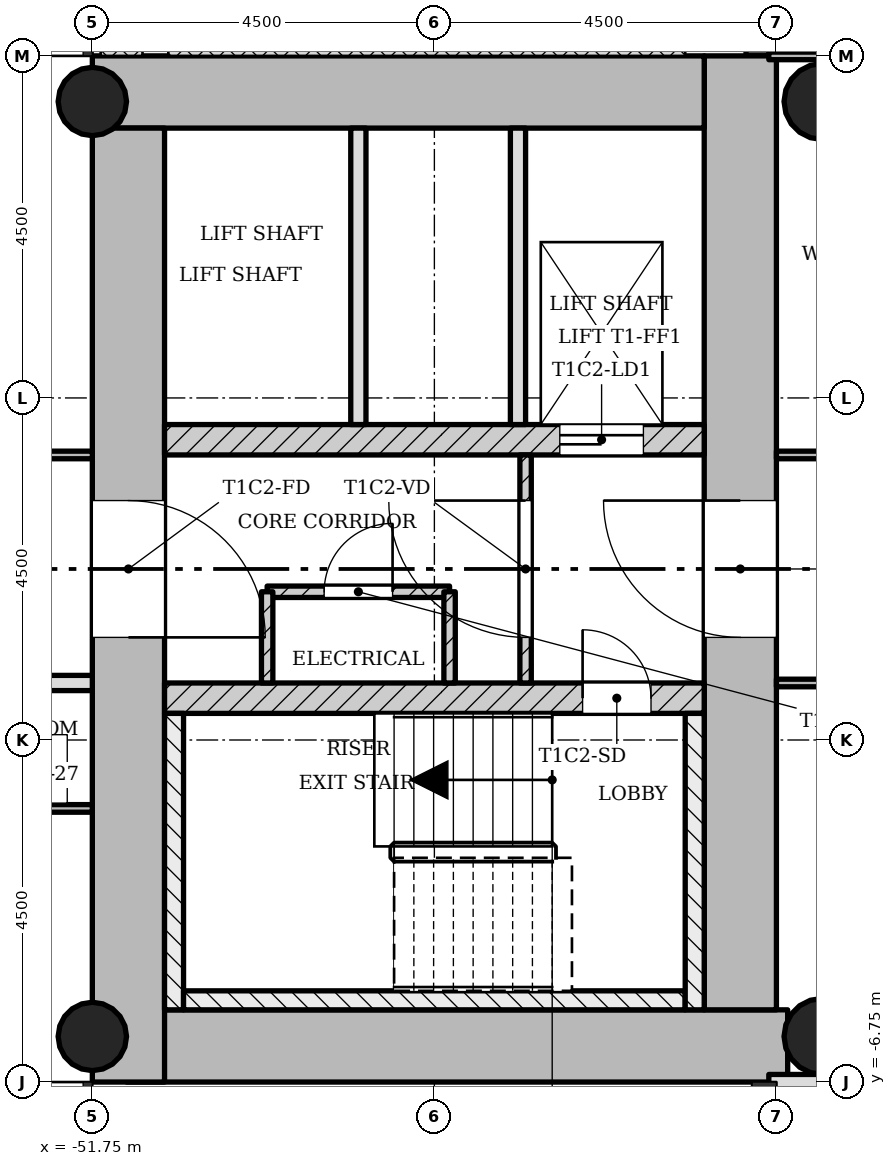
"""IFC4 building model, lengths in metres.
Left out: names, types, materials, properties, quantities, classifications, styles, units other than length and angle.
Written with IfcOpenShell. Run it as: python <this file> out.ifc"""

import sys

from ifc_helpers import new_model, si_unit, direction, frame, frame_2d, origin, origin_2d, place, context, subcontext, project, spatial, rectangle, hollow_circle, extrude, element, fill, save


model = new_model("IFC4")
c1 = context("Model", 3, precision=1e-05, world=origin(), true_north=direction((0.0, 1.0)))
c2 = subcontext(c1, "Body", "Model", "MODEL_VIEW")
j1 = project(units=[si_unit("LENGTHUNIT", "METRE"), si_unit("PLANEANGLEUNIT", "RADIAN")], contexts=[c1])
p1 = place(None, origin())
s1 = spatial("IfcSite", under=j1, at=p1, CompositionType="ELEMENT")
p2 = place(p1, origin())
s2 = spatial("IfcBuilding", under=s1, at=p2, CompositionType="ELEMENT")
p3 = place(p2, frame((0.0, 0.0, 90.2)))
s3 = spatial("IfcBuildingStorey", under=s2, at=p3, CompositionType="ELEMENT", Elevation=90.2)
p4 = place(p3, frame((-51.298, -6.275, 0.0), z_axis=(0.0, 0.0, 1.0), x_axis=(1.0, 0.0, 0.0)))
e1 = element("IfcWall", 1, at=p4, inside=s3, PredefinedType="SHEAR", context=c2, shape_type="SweptSolid", body=[
    extrude(rectangle(XDim=8.696, YDim=0.95, at=frame_2d((4.348, 0.0))), origin(), (0.0, 0.0, 1.0), 3.4),
])
p5 = place(p3, frame((-43.225, -5.8, 0.0), z_axis=(0.0, 0.0, 1.0), x_axis=(0.0, 1.0, 0.0)))
e2 = element("IfcWall", 2, at=p5, inside=s3, PredefinedType="SHEAR", context=c2, shape_type="SweptSolid", body=[
    extrude(rectangle(XDim=12.55, YDim=0.95, at=frame_2d((6.275, 0.0))), origin(), (0.0, 0.0, 1.0), 3.4),
])
p6 = place(p5, frame((4.9, 0.0, 0.0)))
e3 = element("IfcOpeningElement", 3, at=p6, cuts=e2, PredefinedType="OPENING", context=c2, shape_type="SweptSolid", body=[
    extrude(rectangle(XDim=1.8, YDim=2.1, at=frame_2d((0.9, 1.05))), frame((0.0, 0.485, 0.0), z_axis=(0.0, -1.0, 0.0), x_axis=(1.0, 0.0, 0.0)), (0.0, 0.0, 1.0), 0.97),
])
p7 = place(p3, frame((-43.7, 6.275, 0.0), z_axis=(0.0, 0.0, 1.0), x_axis=(-1.0, 0.0, 0.0)))
e4 = element("IfcWall", 4, at=p7, inside=s3, PredefinedType="SHEAR", context=c2, shape_type="SweptSolid", body=[
    extrude(rectangle(XDim=8.05, YDim=0.95, at=frame_2d((4.025, 0.0))), origin(), (0.0, 0.0, 1.0), 3.4),
])
p8 = place(p3, frame((-51.275, 5.8, 0.0), z_axis=(0.0, 0.0, 1.0), x_axis=(0.0, -1.0, 0.0)))
e5 = element("IfcWall", 5, at=p8, inside=s3, PredefinedType="SHEAR", context=c2, shape_type="SweptSolid", body=[
    extrude(rectangle(XDim=12.55, YDim=0.95, at=frame_2d((6.275, 0.0))), origin(), (0.0, 0.0, 1.0), 3.4),
])
p9 = place(p8, frame((4.9, 0.0, 0.0)))
e6 = element("IfcOpeningElement", 6, at=p9, cuts=e5, PredefinedType="OPENING", context=c2, shape_type="SweptSolid", body=[
    extrude(rectangle(XDim=1.8, YDim=2.1, at=frame_2d((0.9, 1.05))), frame((0.0, 0.485, 0.0), z_axis=(0.0, -1.0, 0.0), x_axis=(1.0, 0.0, 0.0)), (0.0, 0.0, 1.0), 0.97),
])
p10 = place(p3, frame((-50.8, -1.7, 0.0), z_axis=(0.0, 0.0, 1.0), x_axis=(1.0, 0.0, 0.0)))
e7 = element("IfcWall", 7, at=p10, inside=s3, PredefinedType="SHEAR", context=c2, shape_type="SweptSolid", body=[
    extrude(rectangle(XDim=7.1, YDim=0.4, at=frame_2d((3.55, 0.0))), origin(), (0.0, 0.0, 1.0), 3.4),
])
p11 = place(p10, frame((5.5, 0.0, 0.0)))
e8 = element("IfcOpeningElement", 8, at=p11, cuts=e7, PredefinedType="OPENING", context=c2, shape_type="SweptSolid", body=[
    extrude(rectangle(XDim=0.9, YDim=2.1, at=frame_2d((0.45, 1.05))), frame((0.0, 0.21, 0.0), z_axis=(0.0, -1.0, 0.0), x_axis=(1.0, 0.0, 0.0)), (0.0, 0.0, 1.0), 0.42),
])
p12 = place(p3, frame((-50.8, 1.7, 0.0), z_axis=(0.0, 0.0, 1.0), x_axis=(1.0, 0.0, 0.0)))
e9 = element("IfcWall", 9, at=p12, inside=s3, PredefinedType="SHEAR", context=c2, shape_type="SweptSolid", body=[
    extrude(rectangle(XDim=7.1, YDim=0.4, at=frame_2d((3.55, 0.0))), origin(), (0.0, 0.0, 1.0), 3.4),
])
p13 = place(p12, frame((5.2, 0.0, 0.0)))
e10 = element("IfcOpeningElement", 10, at=p13, cuts=e9, PredefinedType="OPENING", context=c2, shape_type="SweptSolid", body=[
    extrude(rectangle(XDim=1.1, YDim=2.1, at=frame_2d((0.55, 1.05))), frame((0.0, 0.21, 0.0), z_axis=(0.0, -1.0, 0.0), x_axis=(1.0, 0.0, 0.0)), (0.0, 0.0, 1.0), 0.42),
])
for number, where, z_axis, x_axis in (
    (11, (-51.75, -6.15, 0.0), (0.0, 0.0, 1.0), (1.0, 0.0, 0.0)),
    (12, (-51.75, 6.15, 0.0), (0.0, 0.0, 1.0), (1.0, 0.0, 0.0)),
):
    element("IfcColumn", number, at=place(p3, frame(where, z_axis=z_axis, x_axis=x_axis)), inside=s3, PredefinedType="COLUMN", context=c2, shape_type="SweptSolid", body=[
        extrude(hollow_circle(Radius=0.45, WallThickness=0.032, at=origin_2d()), origin(), (0.0, 0.0, 1.0), 3.4),
    ])
for number, where, z_axis, x_axis in (
    (13, (-42.15, -6.15, 0.0), (0.0, 0.0, 1.0), (1.0, 0.0, 0.0)),
    (14, (-42.15, 6.15, 0.0), (0.0, 0.0, 1.0), (1.0, 0.0, 0.0)),
):
    element("IfcColumn", number, at=place(p3, frame(where, z_axis=z_axis, x_axis=x_axis)), inside=s3, PredefinedType="COLUMN", context=c2, shape_type="SweptSolid", body=[
        extrude(hollow_circle(Radius=0.5, WallThickness=0.036, at=origin_2d()), origin(), (0.0, 0.0, 1.0), 3.4),
    ])
p14 = place(p3, frame((-42.95, 11.25, -0.02), z_axis=(0.0, 0.0, 1.0), x_axis=(0.0, -1.0, 0.0)))
e15 = element("IfcWall", 15, at=p14, inside=s3, PredefinedType="STANDARD", context=c2, shape_type="SweptSolid", body=[
    extrude(rectangle(XDim=4.5, YDim=0.4, at=frame_2d((2.25, 0.0))), origin(), (0.0, 0.0, 1.0), 3.12),
])
p15 = place(p14, frame((1.35, 0.0, 0.02)))
e16 = element("IfcOpeningElement", 16, at=p15, cuts=e15, PredefinedType="OPENING", context=c2, shape_type="SweptSolid", body=[
    extrude(rectangle(XDim=1.8, YDim=2.1, at=frame_2d((0.9, 1.05))), frame((0.0, 0.21, 0.0), z_axis=(0.0, -1.0, 0.0), x_axis=(1.0, 0.0, 0.0)), (0.0, 0.0, 1.0), 0.42),
])
p16 = place(p3, frame((-46.05, 1.5, 0.0), z_axis=(0.0, 0.0, 1.0), x_axis=(0.0, -1.0, 0.0)))
e17 = element("IfcWall", 17, at=p16, inside=s3, PredefinedType="PARTITIONING", context=c2, shape_type="SweptSolid", body=[
    extrude(rectangle(XDim=3.0, YDim=0.15, at=frame_2d((1.5, 0.0))), origin(), (0.0, 0.0, 1.0), 3.0),
])
p17 = place(p16, frame((0.6, 0.0, 0.0)))
e18 = element("IfcOpeningElement", 18, at=p17, cuts=e17, PredefinedType="OPENING", context=c2, shape_type="SweptSolid", body=[
    extrude(rectangle(XDim=1.8, YDim=2.1, at=frame_2d((0.9, 1.05))), frame((0.0, 0.085, 0.0), z_axis=(0.0, -1.0, 0.0), x_axis=(1.0, 0.0, 0.0)), (0.0, 0.0, 1.0), 0.17),
])
for number, where, z_axis, x_axis in (
    (19, (-46.15, 5.8, 0.0), (0.0, 0.0, 1.0), (0.0, -1.0, 0.0)),
    (20, (-48.25, 5.8, 0.0), (0.0, 0.0, 1.0), (0.0, -1.0, 0.0)),
):
    element("IfcWall", number, at=place(p3, frame(where, z_axis=z_axis, x_axis=x_axis)), inside=s3, PredefinedType="SOLIDWALL", context=c2, shape_type="SweptSolid", body=[
        extrude(rectangle(XDim=3.9, YDim=0.2, at=frame_2d((1.95, 0.0))), origin(), (0.0, 0.0, 1.0), 3.0),
    ])
p18 = place(p3, frame((-47.05, -0.3, 0.0), z_axis=(0.0, 0.0, 1.0), x_axis=(-1.0, 0.0, 0.0)))
e21 = element("IfcWall", 21, at=p18, inside=s3, PredefinedType="PARTITIONING", context=c2, shape_type="SweptSolid", body=[
    extrude(rectangle(XDim=2.4, YDim=0.15, at=frame_2d((1.2, 0.0))), origin(), (0.0, 0.0, 1.0), 3.0),
])
p19 = place(p18, frame((0.75, 0.0, 0.0)))
e22 = element("IfcOpeningElement", 22, at=p19, cuts=e21, PredefinedType="OPENING", context=c2, shape_type="SweptSolid", body=[
    extrude(rectangle(XDim=0.9, YDim=2.1, at=frame_2d((0.45, 1.05))), frame((0.0, 0.085, 0.0), z_axis=(0.0, -1.0, 0.0), x_axis=(1.0, 0.0, 0.0)), (0.0, 0.0, 1.0), 0.17),
])
for number, where, z_axis, x_axis in (
    (23, (-47.05, -0.3, 0.0), (0.0, 0.0, 1.0), (0.0, -1.0, 0.0)),
    (24, (-49.45, -0.3, 0.0), (0.0, 0.0, 1.0), (0.0, -1.0, 0.0)),
):
    element("IfcWall", number, at=place(p3, frame(where, z_axis=z_axis, x_axis=x_axis)), inside=s3, PredefinedType="PARTITIONING", context=c2, shape_type="SweptSolid", body=[
        extrude(rectangle(XDim=1.2, YDim=0.15, at=frame_2d((0.6, 0.0))), origin(), (0.0, 0.0, 1.0), 3.0),
    ])
p20 = place(p3, frame((-42.85, -6.75, 0.0), z_axis=(0.0, 0.0, 1.0), x_axis=(1.0, 0.0, 0.0)))
e25 = element("IfcWall", 25, at=p20, inside=s3, PredefinedType="SOLIDWALL", context=c2, shape_type="SweptSolid", body=[
    extrude(rectangle(XDim=13.7, YDim=0.2, at=frame_2d((6.85, 0.0))), origin(), (0.0, 0.0, 1.0), 3.0),
])
p21 = place(p20, frame((6.4, 0.0, 0.0)))
e26 = element("IfcOpeningElement", 26, at=p21, cuts=e25, PredefinedType="OPENING", context=c2, shape_type="SweptSolid", body=[
    extrude(rectangle(XDim=0.9, YDim=2.1, at=frame_2d((0.45, 1.05))), frame((0.0, 0.11, 0.0), z_axis=(0.0, -1.0, 0.0), x_axis=(1.0, 0.0, 0.0)), (0.0, 0.0, 1.0), 0.22),
])
p22 = place(p3, frame((-56.25, -3.15, 0.0), z_axis=(0.0, 0.0, 1.0), x_axis=(1.0, 0.0, 0.0)))
e27 = element("IfcWall", 27, at=p22, inside=s3, PredefinedType="PARTITIONING", context=c2, shape_type="SweptSolid", body=[
    extrude(rectangle(XDim=4.5, YDim=0.1, at=frame_2d((2.25, 0.0))), origin(), (0.0, 0.0, 1.0), 3.0),
])
p23 = place(p22, frame((0.6, 0.0, 0.0)))
e28 = element("IfcOpeningElement", 28, at=p23, cuts=e27, PredefinedType="OPENING", context=c2, shape_type="SweptSolid", body=[
    extrude(rectangle(XDim=0.9, YDim=2.1, at=frame_2d((0.45, 1.05))), frame((0.0, 0.06, 0.0), z_axis=(0.0, -1.0, 0.0), x_axis=(1.0, 0.0, 0.0)), (0.0, 0.0, 1.0), 0.12),
])
p24 = place(p3, frame((-42.75, -1.5, 0.0), z_axis=(0.0, 0.0, 1.0), x_axis=(1.0, 0.0, 0.0)))
e29 = element("IfcWall", 29, at=p24, inside=s3, PredefinedType="PARTITIONING", context=c2, shape_type="SweptSolid", body=[
    extrude(rectangle(XDim=5.85, YDim=0.1, at=frame_2d((2.925, 0.0))), origin(), (0.0, 0.0, 1.0), 3.0),
])
p25 = place(p24, frame((2.475, 0.0, 0.0)))
e30 = element("IfcOpeningElement", 30, at=p25, cuts=e29, PredefinedType="OPENING", context=c2, shape_type="SweptSolid", body=[
    extrude(rectangle(XDim=0.9, YDim=2.1, at=frame_2d((0.45, 1.05))), frame((0.0, 0.06, 0.0), z_axis=(0.0, -1.0, 0.0), x_axis=(1.0, 0.0, 0.0)), (0.0, 0.0, 1.0), 0.12),
])
p26 = place(p3, frame((-56.25, -1.5, 0.0), z_axis=(0.0, 0.0, 1.0), x_axis=(1.0, 0.0, 0.0)))
e31 = element("IfcWall", 31, at=p26, inside=s3, PredefinedType="SOLIDWALL", context=c2, shape_type="SweptSolid", body=[
    extrude(rectangle(XDim=4.5, YDim=0.2, at=frame_2d((2.25, 0.0))), origin(), (0.0, 0.0, 1.0), 3.0),
])
p27 = place(p26, frame((0.6, 0.0, 0.0)))
e32 = element("IfcOpeningElement", 32, at=p27, cuts=e31, PredefinedType="OPENING", context=c2, shape_type="SweptSolid", body=[
    extrude(rectangle(XDim=0.9, YDim=2.1, at=frame_2d((0.45, 1.05))), frame((0.0, 0.11, 0.0), z_axis=(0.0, -1.0, 0.0), x_axis=(1.0, 0.0, 0.0)), (0.0, 0.0, 1.0), 0.22),
])
p28 = place(p3, frame((-56.25, 1.5, 0.0), z_axis=(0.0, 0.0, 1.0), x_axis=(1.0, 0.0, 0.0)))
e33 = element("IfcWall", 33, at=p28, inside=s3, PredefinedType="PARTITIONING", context=c2, shape_type="SweptSolid", body=[
    extrude(rectangle(XDim=4.5, YDim=0.1, at=frame_2d((2.25, 0.0))), origin(), (0.0, 0.0, 1.0), 3.0),
])
p29 = place(p28, frame((1.8, 0.0, 0.0)))
e34 = element("IfcOpeningElement", 34, at=p29, cuts=e33, PredefinedType="OPENING", context=c2, shape_type="SweptSolid", body=[
    extrude(rectangle(XDim=0.9, YDim=2.1, at=frame_2d((0.45, 1.05))), frame((0.0, 0.06, 0.0), z_axis=(0.0, -1.0, 0.0), x_axis=(1.0, 0.0, 0.0)), (0.0, 0.0, 1.0), 0.12),
])
p30 = place(p3, frame((-42.75, 1.5, 0.0), z_axis=(0.0, 0.0, 1.0), x_axis=(1.0, 0.0, 0.0)))
e35 = element("IfcWall", 35, at=p30, inside=s3, PredefinedType="PARTITIONING", context=c2, shape_type="SweptSolid", body=[
    extrude(rectangle(XDim=5.85, YDim=0.1, at=frame_2d((2.925, 0.0))), origin(), (0.0, 0.0, 1.0), 3.0),
])
p31 = place(p30, frame((1.125, 0.0, 0.0)))
e36 = element("IfcOpeningElement", 36, at=p31, cuts=e35, PredefinedType="OPENING", context=c2, shape_type="SweptSolid", body=[
    extrude(rectangle(XDim=0.9, YDim=2.1, at=frame_2d((0.45, 1.05))), frame((0.0, 0.06, 0.0), z_axis=(0.0, -1.0, 0.0), x_axis=(1.0, 0.0, 0.0)), (0.0, 0.0, 1.0), 0.12),
])
p32 = place(p3, frame((-42.85, 6.75, 0.0), z_axis=(0.0, 0.0, 1.0), x_axis=(1.0, 0.0, 0.0)))
e37 = element("IfcWall", 37, at=p32, inside=s3, PredefinedType="PARTITIONING", context=c2, shape_type="SweptSolid", body=[
    extrude(rectangle(XDim=5.95, YDim=0.1, at=frame_2d((2.975, 0.0))), origin(), (0.0, 0.0, 1.0), 3.0),
])
p33 = place(p3, frame((-50.675, -1.9, 0.0), z_axis=(0.0, 0.0, 1.0), x_axis=(0.0, -1.0, 0.0)))
e38 = element("IfcWall", 38, at=p33, inside=s3, PredefinedType="SHEAR", context=c2, shape_type="SweptSolid", body=[
    extrude(rectangle(XDim=3.9, YDim=0.25, at=frame_2d((1.95, 0.0))), origin(), (0.0, 0.0, 1.0), 3.4),
])
p34 = place(p3, frame((-43.95, -5.675, 0.0), z_axis=(0.0, 0.0, 1.0), x_axis=(-1.0, 0.0, 0.0)))
e39 = element("IfcWall", 39, at=p34, inside=s3, PredefinedType="SHEAR", context=c2, shape_type="SweptSolid", body=[
    extrude(rectangle(XDim=6.6, YDim=0.25, at=frame_2d((3.3, 0.0))), origin(), (0.0, 0.0, 1.0), 3.4),
])
p35 = place(p3, frame((-43.825, -1.9, 0.0), z_axis=(0.0, 0.0, 1.0), x_axis=(0.0, -1.0, 0.0)))
e40 = element("IfcWall", 40, at=p35, inside=s3, PredefinedType="SHEAR", context=c2, shape_type="SweptSolid", body=[
    extrude(rectangle(XDim=3.9, YDim=0.25, at=frame_2d((1.95, 0.0))), origin(), (0.0, 0.0, 1.0), 3.4),
])
p36 = place(p17, origin())
e41 = element("IfcDoor", 41, at=p36, inside=s3, OperationType="SINGLE_SWING_LEFT", PredefinedType="DOOR", context=c2, shape_type="SweptSolid", body=[
    extrude(rectangle(XDim=1.8, YDim=2.1, at=frame_2d((0.9, 1.05))), frame((0.0, 0.025, 0.0), z_axis=(0.0, -1.0, 0.0), x_axis=(1.0, 0.0, 0.0)), (0.0, 0.0, 1.0), 0.05),
])
fill(e18, e41)
p37 = place(p19, origin())
e42 = element("IfcDoor", 42, at=p37, inside=s3, OperationType="SINGLE_SWING_LEFT", PredefinedType="DOOR", context=c2, shape_type="SweptSolid", body=[
    extrude(rectangle(XDim=0.9, YDim=2.1, at=frame_2d((0.45, 1.05))), frame((0.0, 0.025, 0.0), z_axis=(0.0, -1.0, 0.0), x_axis=(1.0, 0.0, 0.0)), (0.0, 0.0, 1.0), 0.05),
])
fill(e22, e42)
p38 = place(p11, origin())
e43 = element("IfcDoor", 43, at=p38, inside=s3, OperationType="SINGLE_SWING_RIGHT", PredefinedType="DOOR", context=c2, shape_type="SweptSolid", body=[
    extrude(rectangle(XDim=0.9, YDim=2.1, at=frame_2d((0.45, 1.05))), frame((0.0, 0.025, 0.0), z_axis=(0.0, -1.0, 0.0), x_axis=(1.0, 0.0, 0.0)), (0.0, 0.0, 1.0), 0.05),
])
fill(e8, e43)
p39 = place(p13, origin())
e44 = element("IfcDoor", 44, at=p39, inside=s3, OperationType="SLIDING_TO_LEFT", PredefinedType="DOOR", context=c2, shape_type="SweptSolid", body=[
    extrude(rectangle(XDim=1.1, YDim=2.1, at=frame_2d((0.55, 1.05))), frame((0.0, 0.025, 0.0), z_axis=(0.0, -1.0, 0.0), x_axis=(1.0, 0.0, 0.0)), (0.0, 0.0, 1.0), 0.05),
])
fill(e10, e44)
p40 = place(p6, origin())
e45 = element("IfcDoor", 45, at=p40, inside=s3, OperationType="SINGLE_SWING_LEFT", PredefinedType="DOOR", context=c2, shape_type="SweptSolid", body=[
    extrude(rectangle(XDim=1.8, YDim=2.1, at=frame_2d((0.9, 1.05))), frame((0.0, 0.025, 0.0), z_axis=(0.0, -1.0, 0.0), x_axis=(1.0, 0.0, 0.0)), (0.0, 0.0, 1.0), 0.05),
])
fill(e3, e45)
p41 = place(p9, origin())
e46 = element("IfcDoor", 46, at=p41, inside=s3, OperationType="SINGLE_SWING_LEFT", PredefinedType="DOOR", context=c2, shape_type="SweptSolid", body=[
    extrude(rectangle(XDim=1.8, YDim=2.1, at=frame_2d((0.9, 1.05))), frame((0.0, 0.025, 0.0), z_axis=(0.0, -1.0, 0.0), x_axis=(1.0, 0.0, 0.0)), (0.0, 0.0, 1.0), 0.05),
])
fill(e6, e46)
save(model, sys.argv[1])
